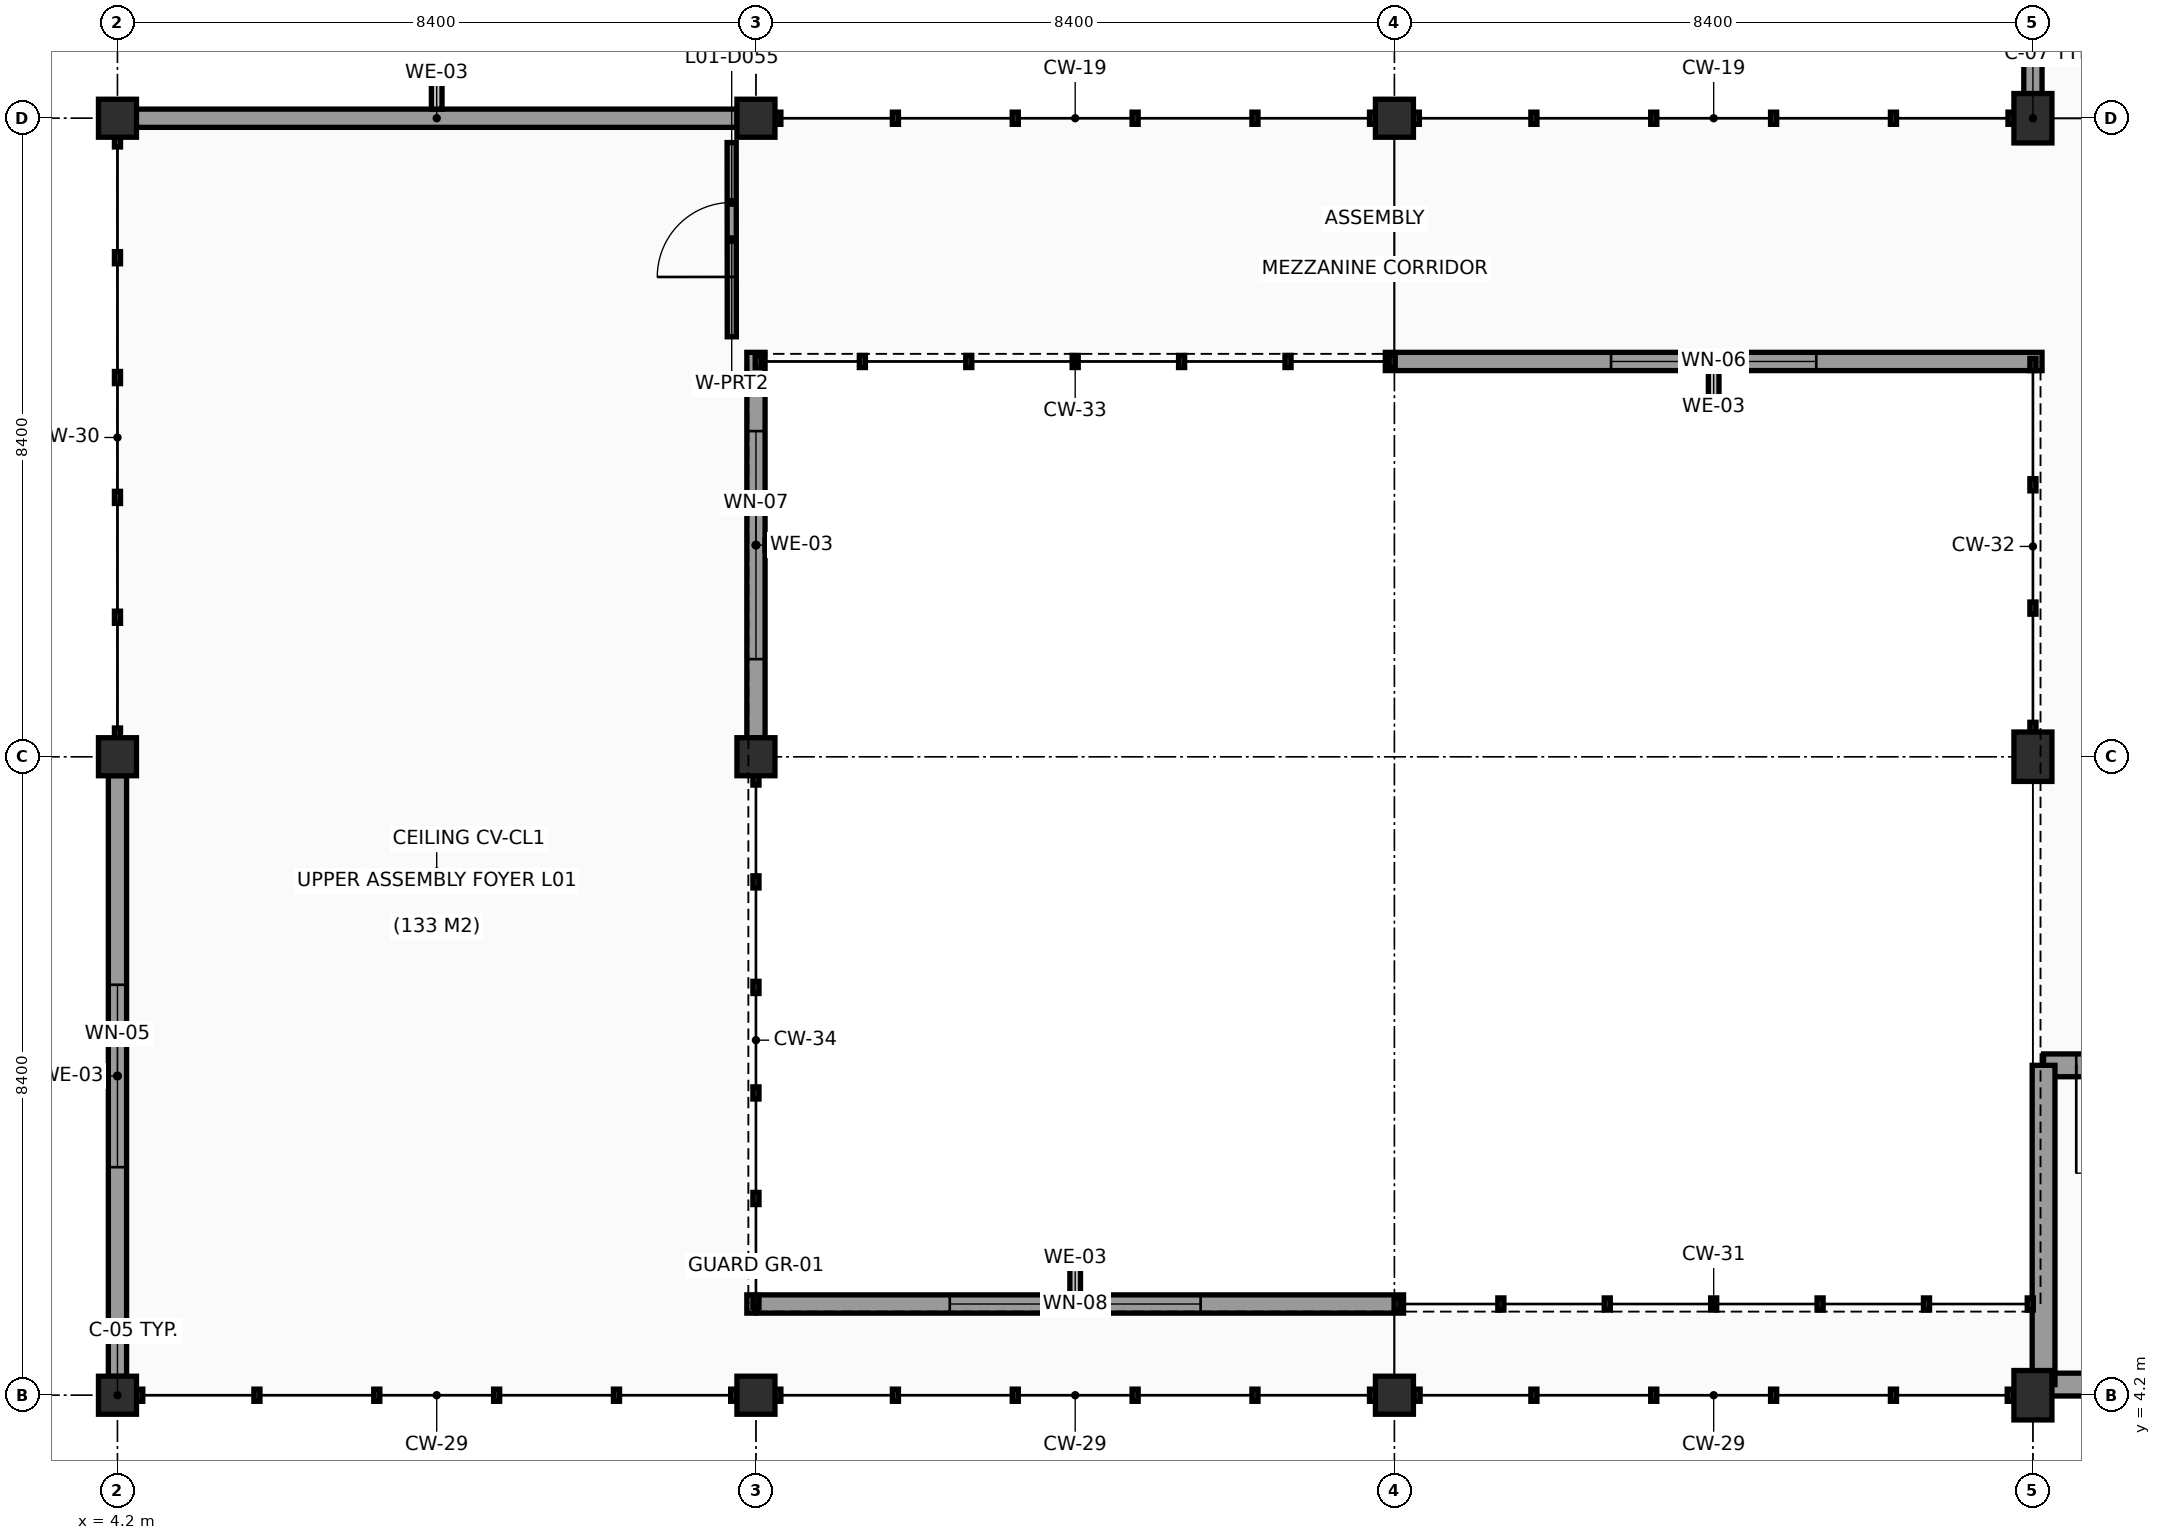
"""IFC4 building model, lengths in metres.
Left out: names, types, materials, properties, quantities, classifications, styles, units other than length and angle.
Written with IfcOpenShell. Run it as: python <this file> out.ifc"""

import sys

from ifc_helpers import new_model, si_unit, direction, frame, frame_2d, origin, origin_2d, place, context, subcontext, project, spatial, rectangle, extrude, element, fill, save


model = new_model("IFC4")
c1 = context("Model", 3, precision=1e-05, world=origin(), true_north=direction((0.0, 1.0)))
c2 = subcontext(c1, "Body", "Model", "MODEL_VIEW")
j1 = project(units=[si_unit("LENGTHUNIT", "METRE"), si_unit("PLANEANGLEUNIT", "RADIAN")], contexts=[c1])
p1 = place(None, origin())
s1 = spatial("IfcSite", under=j1, at=p1, CompositionType="ELEMENT")
p2 = place(p1, origin())
s2 = spatial("IfcBuilding", under=s1, at=p2, CompositionType="ELEMENT")
p3 = place(p2, frame((0.0, 0.0, 4.2)))
s3 = spatial("IfcBuildingStorey", under=s2, at=p3, CompositionType="ELEMENT", Elevation=4.2)
for number, where, z_axis, x_axis in (
    (1, (4.2, 4.2, 0.0), (0.0, 0.0, 1.0), (1.0, 0.0, 0.0)),
    (2, (4.2, 12.6, 0.0), (0.0, 0.0, 1.0), (1.0, 0.0, 0.0)),
    (3, (4.2, 21.0, 0.0), (0.0, 0.0, 1.0), (1.0, 0.0, 0.0)),
    (4, (12.6, 4.2, 0.0), (0.0, 0.0, 1.0), (1.0, 0.0, 0.0)),
    (5, (12.6, 12.6, 0.0), (0.0, 0.0, 1.0), (1.0, 0.0, 0.0)),
    (6, (12.6, 21.0, 0.0), (0.0, 0.0, 1.0), (1.0, 0.0, 0.0)),
    (7, (21.0, 4.2, 0.0), (0.0, 0.0, 1.0), (1.0, 0.0, 0.0)),
    (8, (21.0, 21.0, 0.0), (0.0, 0.0, 1.0), (1.0, 0.0, 0.0)),
):
    element("IfcColumn", number, at=place(p3, frame(where, z_axis=z_axis, x_axis=x_axis)), inside=s3, PredefinedType="COLUMN", context=c2, shape_type="SweptSolid", body=[
        extrude(rectangle(XDim=0.5, YDim=0.5, at=origin_2d()), origin(), (0.0, 0.0, 1.0), 3.6),
    ])
for number, where, z_axis, x_axis in (
    (9, (29.4, 4.2, 0.0), (0.0, 0.0, 1.0), (1.0, 0.0, 0.0)),
    (10, (29.4, 12.6, 0.0), (0.0, 0.0, 1.0), (1.0, 0.0, 0.0)),
    (11, (29.4, 21.0, 0.0), (0.0, 0.0, 1.0), (1.0, 0.0, 0.0)),
):
    element("IfcColumn", number, at=place(p3, frame(where, z_axis=z_axis, x_axis=x_axis)), inside=s3, PredefinedType="COLUMN", context=c2, shape_type="SweptSolid", body=[
        extrude(rectangle(XDim=0.5, YDim=0.65, at=origin_2d()), origin(), (0.0, 0.0, 1.0), 3.6),
    ])
p4 = place(p3, frame((29.4, 21.323, 0.0), z_axis=(0.0, 0.0, 1.0), x_axis=(0.0, 1.0, 0.0)))
e12 = element("IfcWall", 12, at=p4, inside=s3, PredefinedType="SOLIDWALL", context=c2, shape_type="SweptSolid", body=[
    extrude(rectangle(XDim=7.754, YDim=0.24, at=frame_2d((3.877, 0.0))), origin(), (0.0, 0.0, 1.0), 2.58),
])
p5 = place(p3, frame((4.2, 4.448, 0.0), z_axis=(0.0, 0.0, 1.0), x_axis=(0.0, 1.0, 0.0)))
e13 = element("IfcWall", 13, at=p5, inside=s3, PredefinedType="SOLIDWALL", context=c2, shape_type="SweptSolid", body=[
    extrude(rectangle(XDim=7.904, YDim=0.24, at=frame_2d((3.952, 0.0))), origin(), (0.0, 0.0, 1.0), 2.96),
])
p6 = place(p5, frame((2.752, 0.0, 0.95)))
e14 = element("IfcOpeningElement", 14, at=p6, cuts=e13, PredefinedType="OPENING", context=c2, shape_type="SweptSolid", body=[
    extrude(rectangle(XDim=2.4, YDim=1.2, at=frame_2d((1.2, 0.6))), frame((0.0, 0.13, 0.0), z_axis=(0.0, -1.0, 0.0), x_axis=(1.0, 0.0, 0.0)), (0.0, 0.0, 1.0), 0.26),
])
p7 = place(p3, frame((4.448, 21.0, 0.0), z_axis=(0.0, 0.0, 1.0), x_axis=(1.0, 0.0, 0.0)))
e15 = element("IfcWall", 15, at=p7, inside=s3, PredefinedType="SOLIDWALL", context=c2, shape_type="SweptSolid", body=[
    extrude(rectangle(XDim=7.904, YDim=0.24, at=frame_2d((3.952, 0.0))), origin(), (0.0, 0.0, 1.0), 2.62),
])
p8 = place(p3, frame((29.52, 17.8, 0.0), z_axis=(0.0, 0.0, 1.0), x_axis=(-1.0, 0.0, 0.0)))
e16 = element("IfcWall", 16, at=p8, inside=s3, PredefinedType="SOLIDWALL", context=c2, shape_type="SweptSolid", body=[
    extrude(rectangle(XDim=8.64, YDim=0.24, at=frame_2d((4.32, 0.0))), origin(), (0.0, 0.0, 1.0), 2.88),
])
p9 = place(p8, frame((2.97, 0.0, 0.95)))
e17 = element("IfcOpeningElement", 17, at=p9, cuts=e16, PredefinedType="OPENING", context=c2, shape_type="SweptSolid", body=[
    extrude(rectangle(XDim=2.7, YDim=1.2, at=frame_2d((1.35, 0.6))), frame((0.0, 0.13, 0.0), z_axis=(0.0, -1.0, 0.0), x_axis=(1.0, 0.0, 0.0)), (0.0, 0.0, 1.0), 0.26),
])
p10 = place(p3, frame((12.6, 17.92, 0.0), z_axis=(0.0, 0.0, 1.0), x_axis=(0.0, -1.0, 0.0)))
e18 = element("IfcWall", 18, at=p10, inside=s3, PredefinedType="SOLIDWALL", context=c2, shape_type="SweptSolid", body=[
    extrude(rectangle(XDim=5.072, YDim=0.24, at=frame_2d((2.536, 0.0))), origin(), (0.0, 0.0, 1.0), 2.67),
])
p11 = place(p10, frame((1.036, 0.0, 0.95)))
e19 = element("IfcOpeningElement", 19, at=p11, cuts=e18, PredefinedType="OPENING", context=c2, shape_type="SweptSolid", body=[
    extrude(rectangle(XDim=3.0, YDim=1.2, at=frame_2d((1.5, 0.6))), frame((0.0, 0.13, 0.0), z_axis=(0.0, -1.0, 0.0), x_axis=(1.0, 0.0, 0.0)), (0.0, 0.0, 1.0), 0.26),
])
p12 = place(p3, frame((12.48, 5.4, 0.0), z_axis=(0.0, 0.0, 1.0), x_axis=(1.0, 0.0, 0.0)))
e20 = element("IfcWall", 20, at=p12, inside=s3, PredefinedType="SOLIDWALL", context=c2, shape_type="SweptSolid", body=[
    extrude(rectangle(XDim=8.64, YDim=0.24, at=frame_2d((4.32, 0.0))), origin(), (0.0, 0.0, 1.0), 2.67),
])
p13 = place(p12, frame((2.67, 0.0, 0.95)))
e21 = element("IfcOpeningElement", 21, at=p13, cuts=e20, PredefinedType="OPENING", context=c2, shape_type="SweptSolid", body=[
    extrude(rectangle(XDim=3.3, YDim=1.2, at=frame_2d((1.65, 0.6))), frame((0.0, 0.13, 0.0), z_axis=(0.0, -1.0, 0.0), x_axis=(1.0, 0.0, 0.0)), (0.0, 0.0, 1.0), 0.26),
])
p14 = place(p3, frame((29.54, 4.34, 0.0), z_axis=(0.0, 0.0, 1.0), x_axis=(1.0, 0.0, 0.0)))
e22 = element("IfcWall", 22, at=p14, inside=s3, PredefinedType="SHEAR", context=c2, shape_type="SweptSolid", body=[
    extrude(rectangle(XDim=8.12, YDim=0.3, at=frame_2d((4.06, 0.0))), origin(), (0.0, 0.0, 1.0), 3.6),
])
p15 = place(p3, frame((37.66, 8.54, 0.0), z_axis=(0.0, 0.0, 1.0), x_axis=(-1.0, 0.0, 0.0)))
e23 = element("IfcWall", 23, at=p15, inside=s3, PredefinedType="SHEAR", context=c2, shape_type="SweptSolid", body=[
    extrude(rectangle(XDim=8.12, YDim=0.3, at=frame_2d((4.06, 0.0))), origin(), (0.0, 0.0, 1.0), 3.6),
])
p16 = place(p15, frame((6.27, 0.0, 0.0)))
e24 = element("IfcOpeningElement", 24, at=p16, cuts=e23, PredefinedType="OPENING", context=c2, shape_type="SweptSolid", body=[
    extrude(rectangle(XDim=1.42, YDim=2.15, at=frame_2d((0.71, 1.075))), frame((0.0, 0.16, 0.0), z_axis=(0.0, -1.0, 0.0), x_axis=(1.0, 0.0, 0.0)), (0.0, 0.0, 1.0), 0.32),
])
p17 = place(p3, frame((29.54, 8.54, 0.0), z_axis=(0.0, 0.0, 1.0), x_axis=(0.0, -1.0, 0.0)))
e25 = element("IfcWall", 25, at=p17, inside=s3, PredefinedType="SHEAR", context=c2, shape_type="SweptSolid", body=[
    extrude(rectangle(XDim=4.2, YDim=0.3, at=frame_2d((2.1, 0.0))), origin(), (0.0, 0.0, 1.0), 3.6),
])
p18 = place(p3, frame((12.28, 20.68, 0.0), z_axis=(0.0, 0.0, 1.0), x_axis=(0.000764306646, -0.999999707918, 0.0)))
e26 = element("IfcWall", 26, at=p18, inside=s3, PredefinedType="PARTITIONING", context=c2, shape_type="SweptSolid", body=[
    extrude(rectangle(XDim=2.555, YDim=0.12, at=frame_2d((1.278, 0.0))), origin(), (0.0, 0.0, 1.0), 2.82),
])
p19 = place(p18, frame((0.788, 0.0, 0.0)))
e27 = element("IfcOpeningElement", 27, at=p19, cuts=e26, PredefinedType="OPENING", context=c2, shape_type="SweptSolid", body=[
    extrude(rectangle(XDim=0.98, YDim=2.12, at=frame_2d((0.49, 1.06))), frame((0.0, 0.07, 0.0), z_axis=(0.0, -1.0, 0.0), x_axis=(1.0, 0.0, 0.0)), (0.0, 0.0, 1.0), 0.14),
])
p20 = place(p6, origin())
e28 = element("IfcWindow", 28, at=p20, inside=s3, PartitioningType="SINGLE_PANEL", PredefinedType="WINDOW", context=c2, shape_type="SweptSolid", body=[
    extrude(rectangle(XDim=2.4, YDim=1.2, at=frame_2d((1.2, 0.6))), frame((0.0, 0.03, 0.0), z_axis=(0.0, -1.0, 0.0), x_axis=(1.0, 0.0, 0.0)), (0.0, 0.0, 1.0), 0.06),
])
fill(e14, e28)
p21 = place(p9, origin())
e29 = element("IfcWindow", 29, at=p21, inside=s3, PartitioningType="SINGLE_PANEL", PredefinedType="WINDOW", context=c2, shape_type="SweptSolid", body=[
    extrude(rectangle(XDim=2.7, YDim=1.2, at=frame_2d((1.35, 0.6))), frame((0.0, 0.03, 0.0), z_axis=(0.0, -1.0, 0.0), x_axis=(1.0, 0.0, 0.0)), (0.0, 0.0, 1.0), 0.06),
])
fill(e17, e29)
p22 = place(p11, origin())
e30 = element("IfcWindow", 30, at=p22, inside=s3, PartitioningType="SINGLE_PANEL", PredefinedType="WINDOW", context=c2, shape_type="SweptSolid", body=[
    extrude(rectangle(XDim=3.0, YDim=1.2, at=frame_2d((1.5, 0.6))), frame((0.0, 0.03, 0.0), z_axis=(0.0, -1.0, 0.0), x_axis=(1.0, 0.0, 0.0)), (0.0, 0.0, 1.0), 0.06),
])
fill(e19, e30)
p23 = place(p13, origin())
e31 = element("IfcWindow", 31, at=p23, inside=s3, PartitioningType="SINGLE_PANEL", PredefinedType="WINDOW", context=c2, shape_type="SweptSolid", body=[
    extrude(rectangle(XDim=3.3, YDim=1.2, at=frame_2d((1.65, 0.6))), frame((0.0, 0.03, 0.0), z_axis=(0.0, -1.0, 0.0), x_axis=(1.0, 0.0, 0.0)), (0.0, 0.0, 1.0), 0.06),
])
fill(e21, e31)
p24 = place(p16, frame((1.42, 0.0, 0.0), z_axis=(0.0, 0.0, 1.0), x_axis=(-1.0, 0.0, 0.0)))
e32 = element("IfcDoor", 32, at=p24, inside=s3, OperationType="SINGLE_SWING_RIGHT", PredefinedType="DOOR", context=c2, shape_type="SweptSolid", body=[
    extrude(rectangle(XDim=1.42, YDim=2.15, at=frame_2d((0.71, 1.075))), frame((0.0, 0.025, 0.0), z_axis=(0.0, -1.0, 0.0), x_axis=(1.0, 0.0, 0.0)), (0.0, 0.0, 1.0), 0.05),
])
fill(e24, e32)
p25 = place(p19, origin())
e33 = element("IfcDoor", 33, at=p25, inside=s3, OperationType="SINGLE_SWING_RIGHT", PredefinedType="DOOR", context=c2, shape_type="SweptSolid", body=[
    extrude(rectangle(XDim=0.98, YDim=2.12, at=frame_2d((0.49, 1.06))), frame((0.0, 0.025, 0.0), z_axis=(0.0, -1.0, 0.0), x_axis=(1.0, 0.0, 0.0)), (0.0, 0.0, 1.0), 0.05),
])
fill(e27, e33)
save(model, sys.argv[1])
